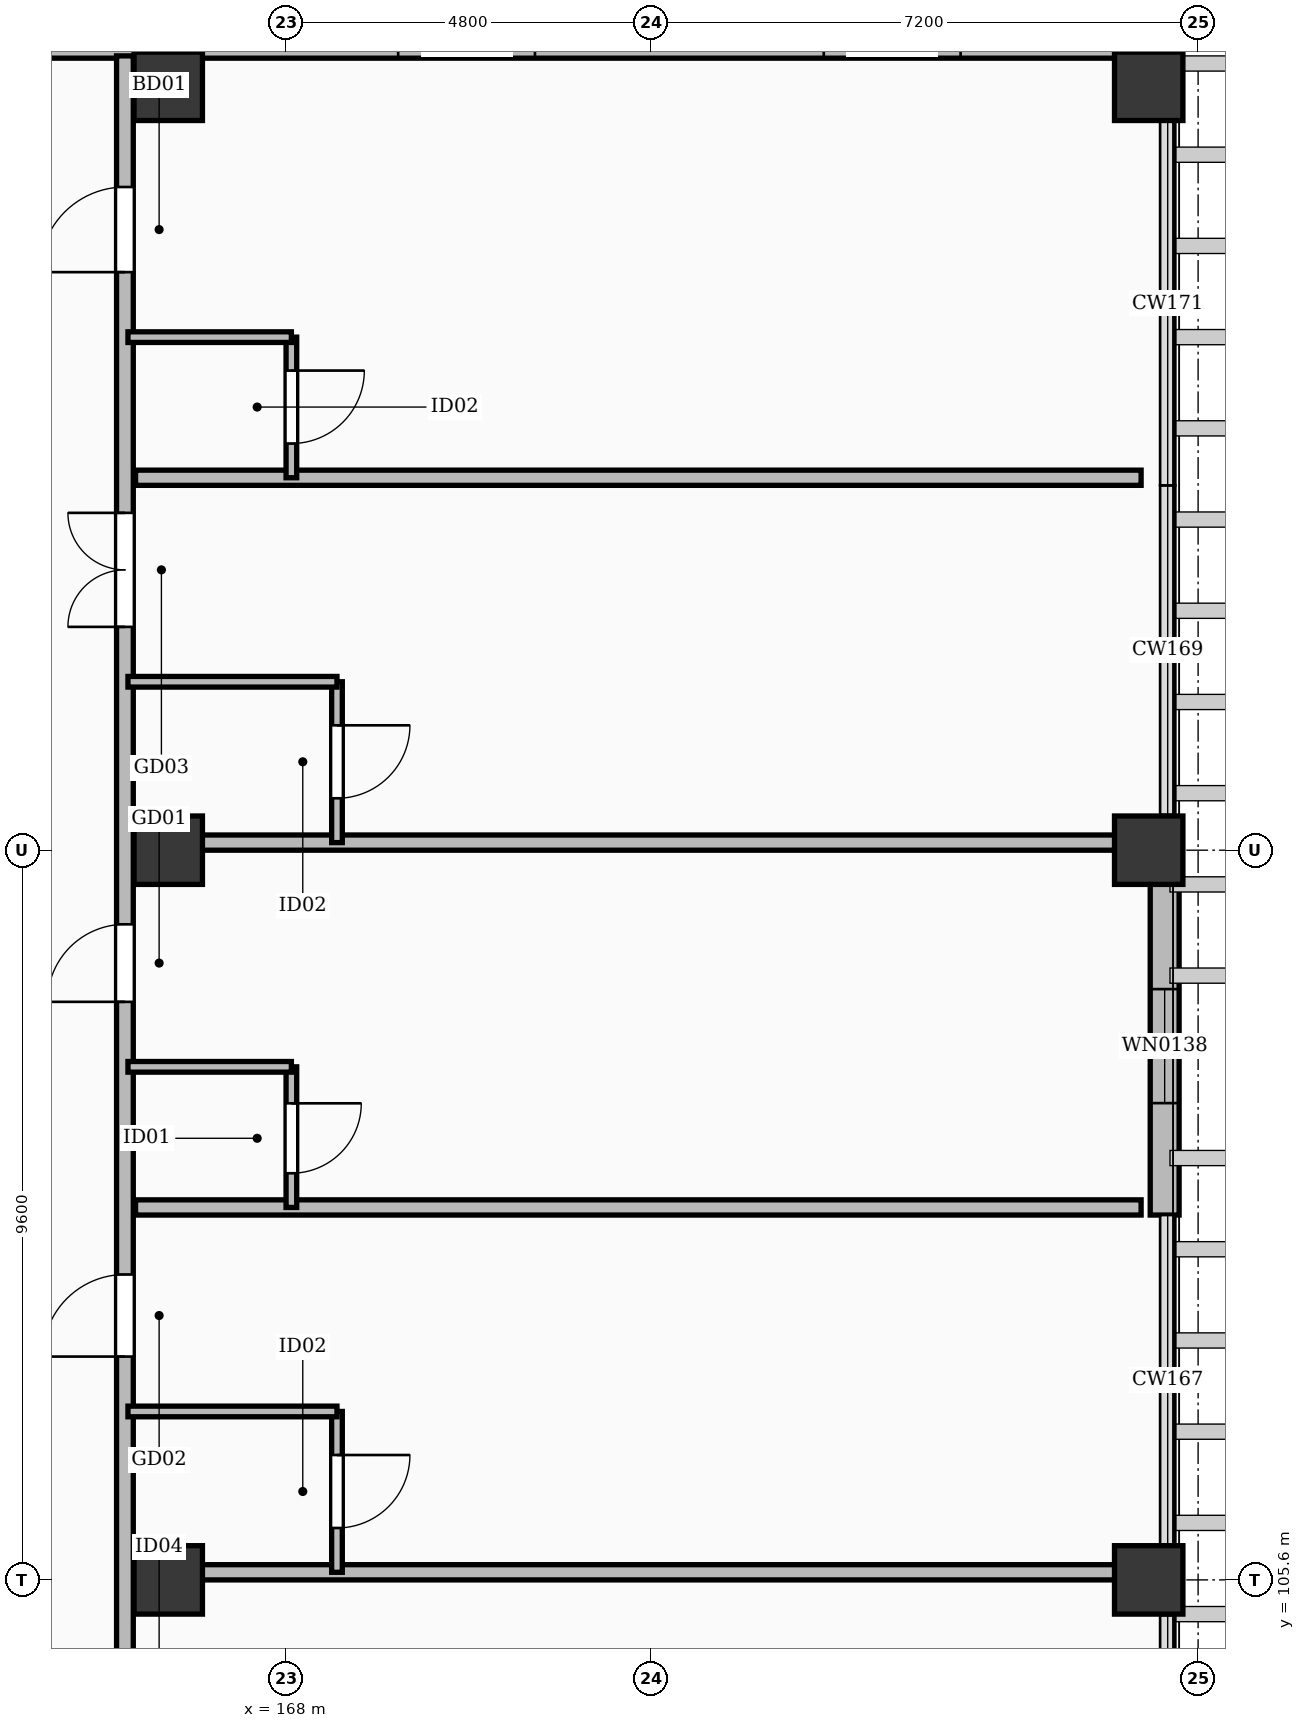
"""IFC4 building model, lengths in metres.
Left out: names, types, materials, properties, quantities, classifications, styles, units other than length and angle.
Written with IfcOpenShell. Run it as: python <this file> out.ifc"""

import sys

from ifc_helpers import new_model, si_unit, direction, frame, frame_2d, origin, origin_2d, place, context, subcontext, project, spatial, rectangle, extrude, element, fill, save


model = new_model("IFC4")
c1 = context("Model", 3, precision=1e-05, world=origin(), true_north=direction((0.0, 1.0)))
c2 = subcontext(c1, "Body", "Model", "MODEL_VIEW")
j1 = project(units=[si_unit("LENGTHUNIT", "METRE"), si_unit("PLANEANGLEUNIT", "RADIAN")], contexts=[c1])
p1 = place(None, origin())
s1 = spatial("IfcSite", under=j1, at=p1, CompositionType="ELEMENT")
p2 = place(p1, origin())
s2 = spatial("IfcBuilding", under=s1, at=p2, CompositionType="ELEMENT")
p3 = place(p2, frame((0.0, 0.0, 16.2)))
s3 = spatial("IfcBuildingStorey", under=s2, at=p3, CompositionType="ELEMENT", Elevation=16.2)
for number, where, z_axis, x_axis in (
    (1, (166.45, 105.6, 0.0), (0.0, 0.0, 1.0), (1.0, 0.0, 0.0)),
    (2, (166.45, 115.2, 0.0), (0.0, 0.0, 1.0), (1.0, 0.0, 0.0)),
    (3, (166.45, 125.25, 0.0), (0.0, 0.0, 1.0), (1.0, 0.0, 0.0)),
    (4, (179.35, 105.6, 0.0), (0.0, 0.0, 1.0), (1.0, 0.0, 0.0)),
    (5, (179.35, 115.2, 0.0), (0.0, 0.0, 1.0), (1.0, 0.0, 0.0)),
    (6, (179.35, 125.25, 0.0), (0.0, 0.0, 1.0), (1.0, 0.0, 0.0)),
):
    element("IfcColumn", number, at=place(p3, frame(where, z_axis=z_axis, x_axis=x_axis)), inside=s3, PredefinedType="COLUMN", context=c2, shape_type="SweptSolid", body=[
        extrude(rectangle(XDim=0.9, YDim=0.9, at=origin_2d()), origin(), (0.0, 0.0, 1.0), 4.8),
    ])
p4 = place(p3, frame((149.875, 125.81, 0.0), z_axis=(0.0, 0.0, 1.0), x_axis=(1.0, 0.0, 0.0)))
e7 = element("IfcWall", 7, at=p4, inside=s3, PredefinedType="SOLIDWALL", context=c2, shape_type="SweptSolid", body=[
    extrude(rectangle(XDim=29.05, YDim=0.38, at=frame_2d((14.525, 0.0))), origin(), (0.0, 0.0, 1.0), 3.032),
])
p5 = place(p4, frame((3.6, 0.0, 0.55)))
e8 = element("IfcOpeningElement", 8, at=p5, cuts=e7, PredefinedType="OPENING", context=c2, shape_type="SweptSolid", body=[
    extrude(rectangle(XDim=1.8, YDim=1.76, at=frame_2d((0.9, 0.88))), frame((0.0, 0.202, 0.0), z_axis=(0.0, -1.0, 0.0), x_axis=(1.0, 0.0, 0.0)), (0.0, 0.0, 1.0), 0.404),
])
p6 = place(p4, frame((9.2, 0.0, 0.55)))
e9 = element("IfcOpeningElement", 9, at=p6, cuts=e7, PredefinedType="OPENING", context=c2, shape_type="SweptSolid", body=[
    extrude(rectangle(XDim=1.8, YDim=1.76, at=frame_2d((0.9, 0.88))), frame((0.0, 0.202, 0.0), z_axis=(0.0, -1.0, 0.0), x_axis=(1.0, 0.0, 0.0)), (0.0, 0.0, 1.0), 0.404),
])
p7 = place(p4, frame((19.6, 0.0, 0.55)))
e10 = element("IfcOpeningElement", 10, at=p7, cuts=e7, PredefinedType="OPENING", context=c2, shape_type="SweptSolid", body=[
    extrude(rectangle(XDim=1.8, YDim=1.76, at=frame_2d((0.9, 0.88))), frame((0.0, 0.202, 0.0), z_axis=(0.0, -1.0, 0.0), x_axis=(1.0, 0.0, 0.0)), (0.0, 0.0, 1.0), 0.404),
])
p8 = place(p4, frame((25.2, 0.0, 0.55)))
e11 = element("IfcOpeningElement", 11, at=p8, cuts=e7, PredefinedType="OPENING", context=c2, shape_type="SweptSolid", body=[
    extrude(rectangle(XDim=1.8, YDim=1.76, at=frame_2d((0.9, 0.88))), frame((0.0, 0.202, 0.0), z_axis=(0.0, -1.0, 0.0), x_axis=(1.0, 0.0, 0.0)), (0.0, 0.0, 1.0), 0.404),
])
p9 = place(p3, frame((179.56, 114.775, 0.0), z_axis=(0.0, 0.0, 1.0), x_axis=(0.0, -1.0, 0.0)))
e12 = element("IfcWall", 12, at=p9, inside=s3, PredefinedType="SOLIDWALL", context=c2, shape_type="SweptSolid", body=[
    extrude(rectangle(XDim=4.375, YDim=0.38, at=frame_2d((2.188, 0.0))), origin(), (0.0, 0.0, 1.0), 3.032),
])
p10 = place(p9, frame((1.403, 0.0, 0.55)))
e13 = element("IfcOpeningElement", 13, at=p10, cuts=e12, PredefinedType="OPENING", context=c2, shape_type="SweptSolid", body=[
    extrude(rectangle(XDim=1.5, YDim=1.74, at=frame_2d((0.75, 0.87))), frame((0.0, 0.202, 0.0), z_axis=(0.0, -1.0, 0.0), x_axis=(1.0, 0.0, 0.0)), (0.0, 0.0, 1.0), 0.404),
])
p11 = place(p3, frame((165.88, 65.4, 0.0), z_axis=(0.0, 0.0, 1.0), x_axis=(0.0, 1.0, 0.0)))
e14 = element("IfcWall", 14, at=p11, inside=s3, PredefinedType="PARTITIONING", context=c2, shape_type="SweptSolid", body=[
    extrude(rectangle(XDim=60.25, YDim=0.22, at=frame_2d((30.125, 0.0))), origin(), (0.0, 0.0, 1.0), 3.732),
])
p12 = place(p11, frame((4.738, 0.0, 0.0)))
e15 = element("IfcOpeningElement", 15, at=p12, cuts=e14, PredefinedType="OPENING", context=c2, shape_type="SweptSolid", body=[
    extrude(rectangle(XDim=1.28, YDim=2.16, at=frame_2d((0.64, 1.08))), frame((0.0, 0.122, 0.0), z_axis=(0.0, -1.0, 0.0), x_axis=(1.0, 0.0, 0.0)), (0.0, 0.0, 1.0), 0.244),
])
p13 = place(p11, frame((9.405, 0.0, 0.0)))
e16 = element("IfcOpeningElement", 16, at=p13, cuts=e14, PredefinedType="OPENING", context=c2, shape_type="SweptSolid", body=[
    extrude(rectangle(XDim=1.05, YDim=2.18, at=frame_2d((0.525, 1.09))), frame((0.0, 0.122, 0.0), z_axis=(0.0, -1.0, 0.0), x_axis=(1.0, 0.0, 0.0)), (0.0, 0.0, 1.0), 0.244),
])
p14 = place(p11, frame((14.338, 0.0, 0.0)))
e17 = element("IfcOpeningElement", 17, at=p14, cuts=e14, PredefinedType="OPENING", context=c2, shape_type="SweptSolid", body=[
    extrude(rectangle(XDim=1.08, YDim=2.25, at=frame_2d((0.54, 1.125))), frame((0.0, 0.122, 0.0), z_axis=(0.0, -1.0, 0.0), x_axis=(1.0, 0.0, 0.0)), (0.0, 0.0, 1.0), 0.244),
])
p15 = place(p11, frame((19.005, 0.0, 0.0)))
e18 = element("IfcOpeningElement", 18, at=p15, cuts=e14, PredefinedType="OPENING", context=c2, shape_type="SweptSolid", body=[
    extrude(rectangle(XDim=1.02, YDim=2.2, at=frame_2d((0.51, 1.1))), frame((0.0, 0.122, 0.0), z_axis=(0.0, -1.0, 0.0), x_axis=(1.0, 0.0, 0.0)), (0.0, 0.0, 1.0), 0.244),
])
p16 = place(p11, frame((23.938, 0.0, 0.0)))
e19 = element("IfcOpeningElement", 19, at=p16, cuts=e14, PredefinedType="OPENING", context=c2, shape_type="SweptSolid", body=[
    extrude(rectangle(XDim=1.5, YDim=2.3, at=frame_2d((0.75, 1.15))), frame((0.0, 0.122, 0.0), z_axis=(0.0, -1.0, 0.0), x_axis=(1.0, 0.0, 0.0)), (0.0, 0.0, 1.0), 0.244),
])
p17 = place(p11, frame((28.605, 0.0, 0.0)))
e20 = element("IfcOpeningElement", 20, at=p17, cuts=e14, PredefinedType="OPENING", context=c2, shape_type="SweptSolid", body=[
    extrude(rectangle(XDim=1.12, YDim=2.15, at=frame_2d((0.56, 1.075))), frame((0.0, 0.122, 0.0), z_axis=(0.0, -1.0, 0.0), x_axis=(1.0, 0.0, 0.0)), (0.0, 0.0, 1.0), 0.244),
])
p18 = place(p11, frame((33.538, 0.0, 0.0)))
e21 = element("IfcOpeningElement", 21, at=p18, cuts=e14, PredefinedType="OPENING", context=c2, shape_type="SweptSolid", body=[
    extrude(rectangle(XDim=1.28, YDim=2.16, at=frame_2d((0.64, 1.08))), frame((0.0, 0.122, 0.0), z_axis=(0.0, -1.0, 0.0), x_axis=(1.0, 0.0, 0.0)), (0.0, 0.0, 1.0), 0.244),
])
p19 = place(p11, frame((38.205, 0.0, 0.0)))
e22 = element("IfcOpeningElement", 22, at=p19, cuts=e14, PredefinedType="OPENING", context=c2, shape_type="SweptSolid", body=[
    extrude(rectangle(XDim=1.05, YDim=2.18, at=frame_2d((0.525, 1.09))), frame((0.0, 0.122, 0.0), z_axis=(0.0, -1.0, 0.0), x_axis=(1.0, 0.0, 0.0)), (0.0, 0.0, 1.0), 0.244),
])
p20 = place(p11, frame((43.138, 0.0, 0.0)))
e23 = element("IfcOpeningElement", 23, at=p20, cuts=e14, PredefinedType="OPENING", context=c2, shape_type="SweptSolid", body=[
    extrude(rectangle(XDim=1.08, YDim=2.25, at=frame_2d((0.54, 1.125))), frame((0.0, 0.122, 0.0), z_axis=(0.0, -1.0, 0.0), x_axis=(1.0, 0.0, 0.0)), (0.0, 0.0, 1.0), 0.244),
])
p21 = place(p11, frame((47.805, 0.0, 0.0)))
e24 = element("IfcOpeningElement", 24, at=p21, cuts=e14, PredefinedType="OPENING", context=c2, shape_type="SweptSolid", body=[
    extrude(rectangle(XDim=1.02, YDim=2.2, at=frame_2d((0.51, 1.1))), frame((0.0, 0.122, 0.0), z_axis=(0.0, -1.0, 0.0), x_axis=(1.0, 0.0, 0.0)), (0.0, 0.0, 1.0), 0.244),
])
p22 = place(p11, frame((52.738, 0.0, 0.0)))
e25 = element("IfcOpeningElement", 25, at=p22, cuts=e14, PredefinedType="OPENING", context=c2, shape_type="SweptSolid", body=[
    extrude(rectangle(XDim=1.5, YDim=2.3, at=frame_2d((0.75, 1.15))), frame((0.0, 0.122, 0.0), z_axis=(0.0, -1.0, 0.0), x_axis=(1.0, 0.0, 0.0)), (0.0, 0.0, 1.0), 0.244),
])
p23 = place(p11, frame((57.405, 0.0, 0.0)))
e26 = element("IfcOpeningElement", 26, at=p23, cuts=e14, PredefinedType="OPENING", context=c2, shape_type="SweptSolid", body=[
    extrude(rectangle(XDim=1.12, YDim=2.15, at=frame_2d((0.56, 1.075))), frame((0.0, 0.122, 0.0), z_axis=(0.0, -1.0, 0.0), x_axis=(1.0, 0.0, 0.0)), (0.0, 0.0, 1.0), 0.244),
])
p24 = place(p3, frame((166.02, 105.7, 0.0), z_axis=(0.0, 0.0, 1.0), x_axis=(1.0, 0.0, 0.0)))
e27 = element("IfcWall", 27, at=p24, inside=s3, PredefinedType="PARTITIONING", context=c2, shape_type="SweptSolid", body=[
    extrude(rectangle(XDim=13.23, YDim=0.2, at=frame_2d((6.615, 0.0))), origin(), (0.0, 0.0, 1.0), 3.032),
])
p25 = place(p3, frame((168.67, 105.7, 0.0), z_axis=(0.0, 0.0, 1.0), x_axis=(0.0, 1.0, 0.0)))
e28 = element("IfcWall", 28, at=p25, inside=s3, PredefinedType="PARTITIONING", context=c2, shape_type="SweptSolid", body=[
    extrude(rectangle(XDim=2.116, YDim=0.14, at=frame_2d((1.058, 0.0))), origin(), (0.0, 0.0, 1.0), 3.732),
])
p26 = place(p25, frame((0.583, 0.0, 0.0)))
e29 = element("IfcOpeningElement", 29, at=p26, cuts=e28, PredefinedType="OPENING", context=c2, shape_type="SweptSolid", body=[
    extrude(rectangle(XDim=0.96, YDim=2.12, at=frame_2d((0.48, 1.06))), frame((0.0, 0.082, 0.0), z_axis=(0.0, -1.0, 0.0), x_axis=(1.0, 0.0, 0.0)), (0.0, 0.0, 1.0), 0.164),
])
p27 = place(p3, frame((165.92, 107.816, 0.0), z_axis=(0.0, 0.0, 1.0), x_axis=(1.0, 0.0, 0.0)))
e30 = element("IfcWall", 30, at=p27, inside=s3, PredefinedType="PARTITIONING", context=c2, shape_type="SweptSolid", body=[
    extrude(rectangle(XDim=2.75, YDim=0.14, at=frame_2d((1.375, 0.0))), origin(), (0.0, 0.0, 1.0), 3.132),
])
p28 = place(p3, frame((166.02, 110.5, 0.0), z_axis=(0.0, 0.0, 1.0), x_axis=(1.0, 0.0, 0.0)))
e31 = element("IfcWall", 31, at=p28, inside=s3, PredefinedType="PARTITIONING", context=c2, shape_type="SweptSolid", body=[
    extrude(rectangle(XDim=13.23, YDim=0.2, at=frame_2d((6.615, 0.0))), origin(), (0.0, 0.0, 1.0), 3.032),
])
p29 = place(p3, frame((168.07, 110.5, 0.0), z_axis=(0.0, 0.0, 1.0), x_axis=(0.0, 1.0, 0.0)))
e32 = element("IfcWall", 32, at=p29, inside=s3, PredefinedType="PARTITIONING", context=c2, shape_type="SweptSolid", body=[
    extrude(rectangle(XDim=1.85, YDim=0.14, at=frame_2d((0.925, 0.0))), origin(), (0.0, 0.0, 1.0), 4.54),
])
p30 = place(p29, frame((0.45, 0.0, 0.0)))
e33 = element("IfcOpeningElement", 33, at=p30, cuts=e32, PredefinedType="OPENING", context=c2, shape_type="SweptSolid", body=[
    extrude(rectangle(XDim=0.92, YDim=2.1, at=frame_2d((0.46, 1.05))), frame((0.0, 0.082, 0.0), z_axis=(0.0, -1.0, 0.0), x_axis=(1.0, 0.0, 0.0)), (0.0, 0.0, 1.0), 0.164),
])
p31 = place(p3, frame((165.92, 112.35, 0.0), z_axis=(0.0, 0.0, 1.0), x_axis=(1.0, 0.0, 0.0)))
e34 = element("IfcWall", 34, at=p31, inside=s3, PredefinedType="PARTITIONING", context=c2, shape_type="SweptSolid", body=[
    extrude(rectangle(XDim=2.15, YDim=0.14, at=frame_2d((1.075, 0.0))), origin(), (0.0, 0.0, 1.0), 3.132),
])
p32 = place(p3, frame((166.02, 115.3, 0.0), z_axis=(0.0, 0.0, 1.0), x_axis=(1.0, 0.0, 0.0)))
e35 = element("IfcWall", 35, at=p32, inside=s3, PredefinedType="PARTITIONING", context=c2, shape_type="SweptSolid", body=[
    extrude(rectangle(XDim=13.23, YDim=0.2, at=frame_2d((6.615, 0.0))), origin(), (0.0, 0.0, 1.0), 3.032),
])
p33 = place(p3, frame((168.67, 115.3, 0.0), z_axis=(0.0, 0.0, 1.0), x_axis=(0.0, 1.0, 0.0)))
e36 = element("IfcWall", 36, at=p33, inside=s3, PredefinedType="PARTITIONING", context=c2, shape_type="SweptSolid", body=[
    extrude(rectangle(XDim=2.116, YDim=0.14, at=frame_2d((1.058, 0.0))), origin(), (0.0, 0.0, 1.0), 3.732),
])
p34 = place(p33, frame((0.583, 0.0, 0.0)))
e37 = element("IfcOpeningElement", 37, at=p34, cuts=e36, PredefinedType="OPENING", context=c2, shape_type="SweptSolid", body=[
    extrude(rectangle(XDim=0.96, YDim=2.12, at=frame_2d((0.48, 1.06))), frame((0.0, 0.082, 0.0), z_axis=(0.0, -1.0, 0.0), x_axis=(1.0, 0.0, 0.0)), (0.0, 0.0, 1.0), 0.164),
])
p35 = place(p3, frame((165.92, 117.416, 0.0), z_axis=(0.0, 0.0, 1.0), x_axis=(1.0, 0.0, 0.0)))
e38 = element("IfcWall", 38, at=p35, inside=s3, PredefinedType="PARTITIONING", context=c2, shape_type="SweptSolid", body=[
    extrude(rectangle(XDim=2.75, YDim=0.14, at=frame_2d((1.375, 0.0))), origin(), (0.0, 0.0, 1.0), 3.132),
])
p36 = place(p3, frame((166.02, 120.1, 0.0), z_axis=(0.0, 0.0, 1.0), x_axis=(1.0, 0.0, 0.0)))
e39 = element("IfcWall", 39, at=p36, inside=s3, PredefinedType="PARTITIONING", context=c2, shape_type="SweptSolid", body=[
    extrude(rectangle(XDim=13.23, YDim=0.2, at=frame_2d((6.615, 0.0))), origin(), (0.0, 0.0, 1.0), 3.032),
])
p37 = place(p3, frame((168.07, 120.1, 0.0), z_axis=(0.0, 0.0, 1.0), x_axis=(0.0, 1.0, 0.0)))
e40 = element("IfcWall", 40, at=p37, inside=s3, PredefinedType="PARTITIONING", context=c2, shape_type="SweptSolid", body=[
    extrude(rectangle(XDim=1.85, YDim=0.14, at=frame_2d((0.925, 0.0))), origin(), (0.0, 0.0, 1.0), 4.54),
])
p38 = place(p37, frame((0.45, 0.0, 0.0)))
e41 = element("IfcOpeningElement", 41, at=p38, cuts=e40, PredefinedType="OPENING", context=c2, shape_type="SweptSolid", body=[
    extrude(rectangle(XDim=0.96, YDim=2.12, at=frame_2d((0.48, 1.06))), frame((0.0, 0.082, 0.0), z_axis=(0.0, -1.0, 0.0), x_axis=(1.0, 0.0, 0.0)), (0.0, 0.0, 1.0), 0.164),
])
p39 = place(p3, frame((165.92, 121.95, 0.0), z_axis=(0.0, 0.0, 1.0), x_axis=(1.0, 0.0, 0.0)))
e42 = element("IfcWall", 42, at=p39, inside=s3, PredefinedType="PARTITIONING", context=c2, shape_type="SweptSolid", body=[
    extrude(rectangle(XDim=2.15, YDim=0.14, at=frame_2d((1.075, 0.0))), origin(), (0.0, 0.0, 1.0), 3.132),
])
p40 = place(p10, origin())
e43 = element("IfcWindow", 43, at=p40, inside=s3, PartitioningType="SINGLE_PANEL", PredefinedType="WINDOW", context=c2, shape_type="SweptSolid", body=[
    extrude(rectangle(XDim=1.5, YDim=1.74, at=frame_2d((0.75, 0.87))), frame((0.0, 0.03, 0.0), z_axis=(0.0, -1.0, 0.0), x_axis=(1.0, 0.0, 0.0)), (0.0, 0.0, 1.0), 0.06),
])
fill(e13, e43)
p41 = place(p20, origin())
e44 = element("IfcDoor", 44, at=p41, inside=s3, OperationType="SINGLE_SWING_LEFT", PredefinedType="DOOR", context=c2, shape_type="SweptSolid", body=[
    extrude(rectangle(XDim=1.08, YDim=2.25, at=frame_2d((0.54, 1.125))), frame((0.0, 0.025, 0.0), z_axis=(0.0, -1.0, 0.0), x_axis=(1.0, 0.0, 0.0)), (0.0, 0.0, 1.0), 0.05),
])
fill(e23, e44)
p42 = place(p26, frame((0.96, 0.0, 0.0), z_axis=(0.0, 0.0, 1.0), x_axis=(-1.0, 0.0, 0.0)))
e45 = element("IfcDoor", 45, at=p42, inside=s3, OperationType="SINGLE_SWING_RIGHT", PredefinedType="DOOR", context=c2, shape_type="SweptSolid", body=[
    extrude(rectangle(XDim=0.96, YDim=2.12, at=frame_2d((0.48, 1.06))), frame((0.0, 0.025, 0.0), z_axis=(0.0, -1.0, 0.0), x_axis=(1.0, 0.0, 0.0)), (0.0, 0.0, 1.0), 0.05),
])
fill(e29, e45)
p43 = place(p21, origin())
e46 = element("IfcDoor", 46, at=p43, inside=s3, OperationType="SINGLE_SWING_LEFT", PredefinedType="DOOR", context=c2, shape_type="SweptSolid", body=[
    extrude(rectangle(XDim=1.02, YDim=2.2, at=frame_2d((0.51, 1.1))), frame((0.0, 0.025, 0.0), z_axis=(0.0, -1.0, 0.0), x_axis=(1.0, 0.0, 0.0)), (0.0, 0.0, 1.0), 0.05),
])
fill(e24, e46)
p44 = place(p30, frame((0.92, 0.0, 0.0), z_axis=(0.0, 0.0, 1.0), x_axis=(-1.0, 0.0, 0.0)))
e47 = element("IfcDoor", 47, at=p44, inside=s3, OperationType="SINGLE_SWING_RIGHT", PredefinedType="DOOR", context=c2, shape_type="SweptSolid", body=[
    extrude(rectangle(XDim=0.92, YDim=2.1, at=frame_2d((0.46, 1.05))), frame((0.0, 0.025, 0.0), z_axis=(0.0, -1.0, 0.0), x_axis=(1.0, 0.0, 0.0)), (0.0, 0.0, 1.0), 0.05),
])
fill(e33, e47)
p45 = place(p22, origin())
e48 = element("IfcDoor", 48, at=p45, inside=s3, OperationType="DOUBLE_DOOR_SINGLE_SWING", PredefinedType="DOOR", context=c2, shape_type="SweptSolid", body=[
    extrude(rectangle(XDim=1.5, YDim=2.3, at=frame_2d((0.75, 1.15))), frame((0.0, 0.025, 0.0), z_axis=(0.0, -1.0, 0.0), x_axis=(1.0, 0.0, 0.0)), (0.0, 0.0, 1.0), 0.05),
])
fill(e25, e48)
p46 = place(p34, frame((0.96, 0.0, 0.0), z_axis=(0.0, 0.0, 1.0), x_axis=(-1.0, 0.0, 0.0)))
e49 = element("IfcDoor", 49, at=p46, inside=s3, OperationType="SINGLE_SWING_RIGHT", PredefinedType="DOOR", context=c2, shape_type="SweptSolid", body=[
    extrude(rectangle(XDim=0.96, YDim=2.12, at=frame_2d((0.48, 1.06))), frame((0.0, 0.025, 0.0), z_axis=(0.0, -1.0, 0.0), x_axis=(1.0, 0.0, 0.0)), (0.0, 0.0, 1.0), 0.05),
])
fill(e37, e49)
p47 = place(p23, origin())
e50 = element("IfcDoor", 50, at=p47, inside=s3, OperationType="SINGLE_SWING_LEFT", PredefinedType="DOOR", context=c2, shape_type="SweptSolid", body=[
    extrude(rectangle(XDim=1.12, YDim=2.15, at=frame_2d((0.56, 1.075))), frame((0.0, 0.025, 0.0), z_axis=(0.0, -1.0, 0.0), x_axis=(1.0, 0.0, 0.0)), (0.0, 0.0, 1.0), 0.05),
])
fill(e26, e50)
p48 = place(p38, frame((0.96, 0.0, 0.0), z_axis=(0.0, 0.0, 1.0), x_axis=(-1.0, 0.0, 0.0)))
e51 = element("IfcDoor", 51, at=p48, inside=s3, OperationType="SINGLE_SWING_RIGHT", PredefinedType="DOOR", context=c2, shape_type="SweptSolid", body=[
    extrude(rectangle(XDim=0.96, YDim=2.12, at=frame_2d((0.48, 1.06))), frame((0.0, 0.025, 0.0), z_axis=(0.0, -1.0, 0.0), x_axis=(1.0, 0.0, 0.0)), (0.0, 0.0, 1.0), 0.05),
])
fill(e41, e51)
save(model, sys.argv[1])
